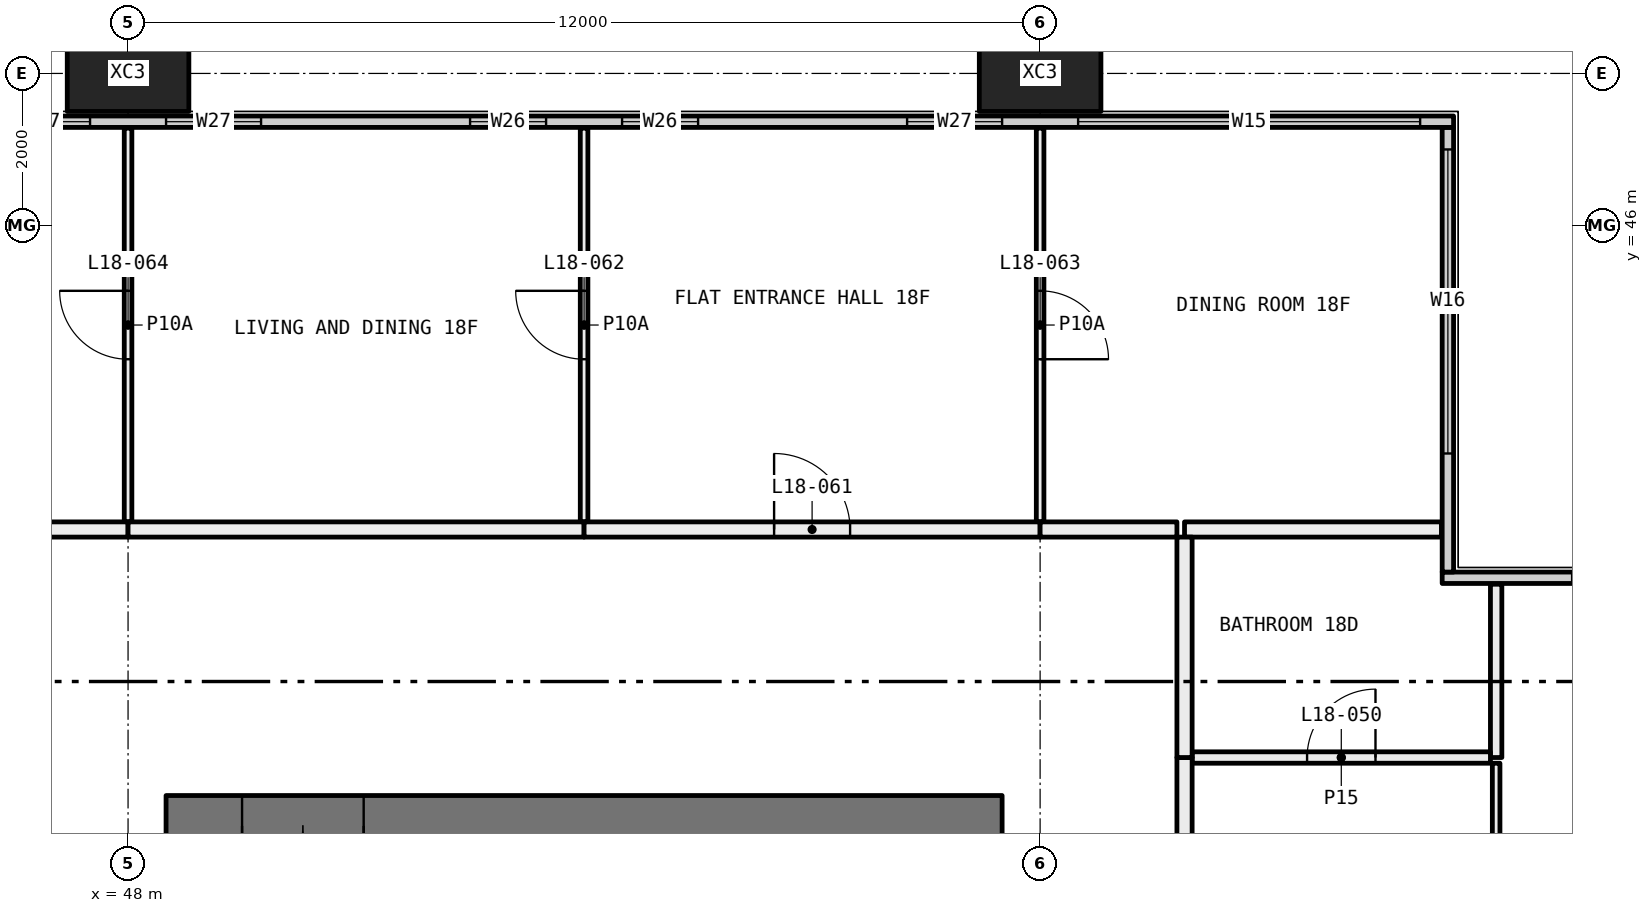
"""IFC4 building model, lengths in metres.
Left out: names, types, materials, properties, quantities, classifications, styles, units other than length and angle.
Written with IfcOpenShell. Run it as: python <this file> out.ifc"""

import sys

from ifc_helpers import new_model, si_unit, direction, frame, frame_2d, origin, origin_2d, place, context, subcontext, project, spatial, rectangle, hollow_rectangle, extrude, element, fill, save


model = new_model("IFC4")
c1 = context("Model", 3, precision=1e-05, world=origin(), true_north=direction((0.0, 1.0)))
c2 = subcontext(c1, "Body", "Model", "MODEL_VIEW")
j1 = project(units=[si_unit("LENGTHUNIT", "METRE"), si_unit("PLANEANGLEUNIT", "RADIAN")], contexts=[c1])
p1 = place(None, origin())
s1 = spatial("IfcSite", under=j1, at=p1, CompositionType="ELEMENT")
p2 = place(p1, origin())
s2 = spatial("IfcBuilding", under=s1, at=p2, CompositionType="ELEMENT")
p3 = place(p2, frame((0.0, 0.0, 74.85)))
s3 = spatial("IfcBuildingStorey", under=s2, at=p3, CompositionType="ELEMENT", Elevation=74.85)
for number, where, z_axis, x_axis in (
    (1, (48.0, 48.0, -0.4), (0.0, 0.0, 1.0), (1.0, 0.0, 0.0)),
    (2, (60.0, 48.0, -0.4), (0.0, 0.0, 1.0), (1.0, 0.0, 0.0)),
):
    element("IfcColumn", number, at=place(p3, frame(where, z_axis=z_axis, x_axis=x_axis)), inside=s3, PredefinedType="COLUMN", context=c2, shape_type="SweptSolid", body=[
        extrude(hollow_rectangle(XDim=1.6, YDim=1.0, WallThickness=0.065, at=origin_2d()), origin(), (0.0, 0.0, 1.0), 3.45),
    ])
p4 = place(p3, frame((65.29, 41.365, 0.0), z_axis=(0.0, 0.0, 1.0), x_axis=(1.0, 0.0, 0.0)))
e3 = element("IfcWall", 3, at=p4, inside=s3, PredefinedType="ELEMENTEDWALL", context=c2, shape_type="SweptSolid", body=[
    extrude(rectangle(XDim=6.15, YDim=0.15, at=frame_2d((3.075, 0.0))), origin(), (0.0, 0.0, 1.0), 3.05),
])
p5 = place(p4, frame((1.71, 0.0, 0.45)))
e4 = element("IfcOpeningElement", 4, at=p5, cuts=e3, PredefinedType="OPENING", context=c2, shape_type="SweptSolid", body=[
    extrude(rectangle(XDim=4.0, YDim=2.55, at=frame_2d((2.0, 1.275))), frame((0.0, 0.085, 0.0), z_axis=(0.0, -1.0, 0.0), x_axis=(1.0, 0.0, 0.0)), (0.0, 0.0, 1.0), 0.17),
])
p6 = place(p3, frame((65.365, 41.44, 0.0), z_axis=(0.0, 0.0, 1.0), x_axis=(0.0, 1.0, 0.0)))
e5 = element("IfcWall", 5, at=p6, inside=s3, PredefinedType="ELEMENTEDWALL", context=c2, shape_type="SweptSolid", body=[
    extrude(rectangle(XDim=5.85, YDim=0.15, at=frame_2d((2.925, 0.0))), origin(), (0.0, 0.0, 1.0), 3.05),
])
p7 = place(p6, frame((1.56, 0.0, 0.45)))
e6 = element("IfcOpeningElement", 6, at=p7, cuts=e5, PredefinedType="OPENING", context=c2, shape_type="SweptSolid", body=[
    extrude(rectangle(XDim=4.0, YDim=2.55, at=frame_2d((2.0, 1.275))), frame((0.0, 0.085, 0.0), z_axis=(0.0, -1.0, 0.0), x_axis=(1.0, 0.0, 0.0)), (0.0, 0.0, 1.0), 0.17),
])
p8 = place(p3, frame((6.56, 47.365, 0.0), z_axis=(0.0, 0.0, 1.0), x_axis=(1.0, 0.0, 0.0)))
e7 = element("IfcWall", 7, at=p8, inside=s3, PredefinedType="ELEMENTEDWALL", context=c2, shape_type="SweptSolid", body=[
    extrude(rectangle(XDim=58.88, YDim=0.15, at=frame_2d((29.44, 0.0))), origin(), (0.0, 0.0, 1.0), 3.05),
])
p9 = place(p8, frame((0.44, 0.0, 0.45)))
e8 = element("IfcOpeningElement", 8, at=p9, cuts=e7, PredefinedType="OPENING", context=c2, shape_type="SweptSolid", body=[
    extrude(rectangle(XDim=4.5, YDim=2.55, at=frame_2d((2.25, 1.275))), frame((0.0, 0.085, 0.0), z_axis=(0.0, -1.0, 0.0), x_axis=(1.0, 0.0, 0.0)), (0.0, 0.0, 1.0), 0.17),
])
p10 = place(p8, frame((5.94, 0.0, 0.45)))
e9 = element("IfcOpeningElement", 9, at=p10, cuts=e7, PredefinedType="OPENING", context=c2, shape_type="SweptSolid", body=[
    extrude(rectangle(XDim=1.25, YDim=2.55, at=frame_2d((0.625, 1.275))), frame((0.0, 0.085, 0.0), z_axis=(0.0, -1.0, 0.0), x_axis=(1.0, 0.0, 0.0)), (0.0, 0.0, 1.0), 0.17),
])
p11 = place(p8, frame((9.94, 0.0, 0.45)))
e10 = element("IfcOpeningElement", 10, at=p11, cuts=e7, PredefinedType="OPENING", context=c2, shape_type="SweptSolid", body=[
    extrude(rectangle(XDim=1.0, YDim=2.55, at=frame_2d((0.5, 1.275))), frame((0.0, 0.085, 0.0), z_axis=(0.0, -1.0, 0.0), x_axis=(1.0, 0.0, 0.0)), (0.0, 0.0, 1.0), 0.17),
])
p12 = place(p8, frame((11.94, 0.0, 0.45)))
e11 = element("IfcOpeningElement", 11, at=p12, cuts=e7, PredefinedType="OPENING", context=c2, shape_type="SweptSolid", body=[
    extrude(rectangle(XDim=1.0, YDim=2.55, at=frame_2d((0.5, 1.275))), frame((0.0, 0.085, 0.0), z_axis=(0.0, -1.0, 0.0), x_axis=(1.0, 0.0, 0.0)), (0.0, 0.0, 1.0), 0.17),
])
p13 = place(p8, frame((15.69, 0.0, 0.45)))
e12 = element("IfcOpeningElement", 12, at=p13, cuts=e7, PredefinedType="OPENING", context=c2, shape_type="SweptSolid", body=[
    extrude(rectangle(XDim=1.25, YDim=2.55, at=frame_2d((0.625, 1.275))), frame((0.0, 0.085, 0.0), z_axis=(0.0, -1.0, 0.0), x_axis=(1.0, 0.0, 0.0)), (0.0, 0.0, 1.0), 0.17),
])
p14 = place(p8, frame((17.94, 0.0, 0.45)))
e13 = element("IfcOpeningElement", 13, at=p14, cuts=e7, PredefinedType="OPENING", context=c2, shape_type="SweptSolid", body=[
    extrude(rectangle(XDim=1.25, YDim=2.55, at=frame_2d((0.625, 1.275))), frame((0.0, 0.085, 0.0), z_axis=(0.0, -1.0, 0.0), x_axis=(1.0, 0.0, 0.0)), (0.0, 0.0, 1.0), 0.17),
])
p15 = place(p8, frame((21.94, 0.0, 0.45)))
e14 = element("IfcOpeningElement", 14, at=p15, cuts=e7, PredefinedType="OPENING", context=c2, shape_type="SweptSolid", body=[
    extrude(rectangle(XDim=1.0, YDim=2.55, at=frame_2d((0.5, 1.275))), frame((0.0, 0.085, 0.0), z_axis=(0.0, -1.0, 0.0), x_axis=(1.0, 0.0, 0.0)), (0.0, 0.0, 1.0), 0.17),
])
p16 = place(p8, frame((23.94, 0.0, 0.45)))
e15 = element("IfcOpeningElement", 15, at=p16, cuts=e7, PredefinedType="OPENING", context=c2, shape_type="SweptSolid", body=[
    extrude(rectangle(XDim=1.0, YDim=2.55, at=frame_2d((0.5, 1.275))), frame((0.0, 0.085, 0.0), z_axis=(0.0, -1.0, 0.0), x_axis=(1.0, 0.0, 0.0)), (0.0, 0.0, 1.0), 0.17),
])
p17 = place(p8, frame((27.69, 0.0, 0.45)))
e16 = element("IfcOpeningElement", 16, at=p17, cuts=e7, PredefinedType="OPENING", context=c2, shape_type="SweptSolid", body=[
    extrude(rectangle(XDim=1.25, YDim=2.55, at=frame_2d((0.625, 1.275))), frame((0.0, 0.085, 0.0), z_axis=(0.0, -1.0, 0.0), x_axis=(1.0, 0.0, 0.0)), (0.0, 0.0, 1.0), 0.17),
])
p18 = place(p8, frame((29.94, 0.0, 0.45)))
e17 = element("IfcOpeningElement", 17, at=p18, cuts=e7, PredefinedType="OPENING", context=c2, shape_type="SweptSolid", body=[
    extrude(rectangle(XDim=1.25, YDim=2.55, at=frame_2d((0.625, 1.275))), frame((0.0, 0.085, 0.0), z_axis=(0.0, -1.0, 0.0), x_axis=(1.0, 0.0, 0.0)), (0.0, 0.0, 1.0), 0.17),
])
p19 = place(p8, frame((33.94, 0.0, 0.45)))
e18 = element("IfcOpeningElement", 18, at=p19, cuts=e7, PredefinedType="OPENING", context=c2, shape_type="SweptSolid", body=[
    extrude(rectangle(XDim=1.0, YDim=2.55, at=frame_2d((0.5, 1.275))), frame((0.0, 0.085, 0.0), z_axis=(0.0, -1.0, 0.0), x_axis=(1.0, 0.0, 0.0)), (0.0, 0.0, 1.0), 0.17),
])
p20 = place(p8, frame((35.94, 0.0, 0.45)))
e19 = element("IfcOpeningElement", 19, at=p20, cuts=e7, PredefinedType="OPENING", context=c2, shape_type="SweptSolid", body=[
    extrude(rectangle(XDim=1.0, YDim=2.55, at=frame_2d((0.5, 1.275))), frame((0.0, 0.085, 0.0), z_axis=(0.0, -1.0, 0.0), x_axis=(1.0, 0.0, 0.0)), (0.0, 0.0, 1.0), 0.17),
])
p21 = place(p8, frame((39.69, 0.0, 0.45)))
e20 = element("IfcOpeningElement", 20, at=p21, cuts=e7, PredefinedType="OPENING", context=c2, shape_type="SweptSolid", body=[
    extrude(rectangle(XDim=1.25, YDim=2.55, at=frame_2d((0.625, 1.275))), frame((0.0, 0.085, 0.0), z_axis=(0.0, -1.0, 0.0), x_axis=(1.0, 0.0, 0.0)), (0.0, 0.0, 1.0), 0.17),
])
p22 = place(p8, frame((41.94, 0.0, 0.45)))
e21 = element("IfcOpeningElement", 21, at=p22, cuts=e7, PredefinedType="OPENING", context=c2, shape_type="SweptSolid", body=[
    extrude(rectangle(XDim=1.25, YDim=2.55, at=frame_2d((0.625, 1.275))), frame((0.0, 0.085, 0.0), z_axis=(0.0, -1.0, 0.0), x_axis=(1.0, 0.0, 0.0)), (0.0, 0.0, 1.0), 0.17),
])
p23 = place(p8, frame((45.94, 0.0, 0.45)))
e22 = element("IfcOpeningElement", 22, at=p23, cuts=e7, PredefinedType="OPENING", context=c2, shape_type="SweptSolid", body=[
    extrude(rectangle(XDim=1.0, YDim=2.55, at=frame_2d((0.5, 1.275))), frame((0.0, 0.085, 0.0), z_axis=(0.0, -1.0, 0.0), x_axis=(1.0, 0.0, 0.0)), (0.0, 0.0, 1.0), 0.17),
])
p24 = place(p8, frame((47.94, 0.0, 0.45)))
e23 = element("IfcOpeningElement", 23, at=p24, cuts=e7, PredefinedType="OPENING", context=c2, shape_type="SweptSolid", body=[
    extrude(rectangle(XDim=1.0, YDim=2.55, at=frame_2d((0.5, 1.275))), frame((0.0, 0.085, 0.0), z_axis=(0.0, -1.0, 0.0), x_axis=(1.0, 0.0, 0.0)), (0.0, 0.0, 1.0), 0.17),
])
p25 = place(p8, frame((51.69, 0.0, 0.45)))
e24 = element("IfcOpeningElement", 24, at=p25, cuts=e7, PredefinedType="OPENING", context=c2, shape_type="SweptSolid", body=[
    extrude(rectangle(XDim=1.25, YDim=2.55, at=frame_2d((0.625, 1.275))), frame((0.0, 0.085, 0.0), z_axis=(0.0, -1.0, 0.0), x_axis=(1.0, 0.0, 0.0)), (0.0, 0.0, 1.0), 0.17),
])
p26 = place(p8, frame((53.94, 0.0, 0.45)))
e25 = element("IfcOpeningElement", 25, at=p26, cuts=e7, PredefinedType="OPENING", context=c2, shape_type="SweptSolid", body=[
    extrude(rectangle(XDim=4.5, YDim=2.55, at=frame_2d((2.25, 1.275))), frame((0.0, 0.085, 0.0), z_axis=(0.0, -1.0, 0.0), x_axis=(1.0, 0.0, 0.0)), (0.0, 0.0, 1.0), 0.17),
])
p27 = place(p3, frame((66.0, 38.925, 0.0), z_axis=(0.0, 0.0, 1.0), x_axis=(0.0, -1.0, 0.0)))
e26 = element("IfcWall", 26, at=p27, inside=s3, PredefinedType="PARTITIONING", context=c2, shape_type="SweptSolid", body=[
    extrude(rectangle(XDim=2.875, YDim=0.1, at=frame_2d((1.438, 0.0))), origin(), (0.0, 0.0, 1.0), 2.45),
])
p28 = place(p3, frame((66.0, 41.28, 0.0), z_axis=(0.0, 0.0, 1.0), x_axis=(0.0, -1.0, 0.0)))
e27 = element("IfcWall", 27, at=p28, inside=s3, PredefinedType="PARTITIONING", context=c2, shape_type="SweptSolid", body=[
    extrude(rectangle(XDim=2.28, YDim=0.15, at=frame_2d((1.14, 0.0))), origin(), (0.0, 0.0, 1.0), 3.05),
])
p29 = place(p3, frame((65.925, 39.0, 0.0), z_axis=(0.0, 0.0, 1.0), x_axis=(-1.0, 0.0, 0.0)))
e28 = element("IfcWall", 28, at=p29, inside=s3, PredefinedType="PARTITIONING", context=c2, shape_type="SweptSolid", body=[
    extrude(rectangle(XDim=3.925, YDim=0.15, at=frame_2d((1.962, 0.0))), origin(), (0.0, 0.0, 1.0), 3.05),
])
p30 = place(p29, frame((1.512, 0.0, 0.0)))
e29 = element("IfcOpeningElement", 29, at=p30, cuts=e28, PredefinedType="OPENING", context=c2, shape_type="SweptSolid", body=[
    extrude(rectangle(XDim=0.9, YDim=2.1, at=frame_2d((0.45, 1.05))), frame((0.0, 0.085, 0.0), z_axis=(0.0, -1.0, 0.0), x_axis=(1.0, 0.0, 0.0)), (0.0, 0.0, 1.0), 0.17),
])
p31 = place(p3, frame((61.9, 39.0, 0.0), z_axis=(0.0, 0.0, 1.0), x_axis=(0.0, -1.0, 0.0)))
e30 = element("IfcWall", 30, at=p31, inside=s3, PredefinedType="PARTITIONING", context=c2, shape_type="SweptSolid", body=[
    extrude(rectangle(XDim=3.1, YDim=0.2, at=frame_2d((1.55, 0.0))), origin(), (0.0, 0.0, 1.0), 2.45),
])
p32 = place(p3, frame((65.28, 42.0, 0.0), z_axis=(0.0, 0.0, 1.0), x_axis=(-1.0, 0.0, 0.0)))
e31 = element("IfcWall", 31, at=p32, inside=s3, PredefinedType="PARTITIONING", context=c2, shape_type="SweptSolid", body=[
    extrude(rectangle(XDim=3.38, YDim=0.2, at=frame_2d((1.69, 0.0))), origin(), (0.0, 0.0, 1.0), 3.05),
])
p33 = place(p3, frame((61.9, 41.9, 0.0), z_axis=(0.0, 0.0, 1.0), x_axis=(0.0, -1.0, 0.0)))
e32 = element("IfcWall", 32, at=p33, inside=s3, PredefinedType="PARTITIONING", context=c2, shape_type="SweptSolid", body=[
    extrude(rectangle(XDim=2.9, YDim=0.2, at=frame_2d((1.45, 0.0))), origin(), (0.0, 0.0, 1.0), 3.05),
])
p34 = place(p3, frame((48.0, 42.1, 0.0), z_axis=(0.0, 0.0, 1.0), x_axis=(0.0, 1.0, 0.0)))
e33 = element("IfcWall", 33, at=p34, inside=s3, PredefinedType="PARTITIONING", context=c2, shape_type="SweptSolid", body=[
    extrude(rectangle(XDim=5.18, YDim=0.1, at=frame_2d((2.59, 0.0))), origin(), (0.0, 0.0, 1.0), 3.05),
])
p35 = place(p34, frame((2.14, 0.0, 0.0)))
e34 = element("IfcOpeningElement", 34, at=p35, cuts=e33, PredefinedType="OPENING", context=c2, shape_type="SweptSolid", body=[
    extrude(rectangle(XDim=0.9, YDim=2.1, at=frame_2d((0.45, 1.05))), frame((0.0, 0.06, 0.0), z_axis=(0.0, -1.0, 0.0), x_axis=(1.0, 0.0, 0.0)), (0.0, 0.0, 1.0), 0.12),
])
p36 = place(p3, frame((46.1, 42.0, 0.0), z_axis=(0.0, 0.0, 1.0), x_axis=(1.0, 0.0, 0.0)))
e35 = element("IfcWall", 35, at=p36, inside=s3, PredefinedType="PARTITIONING", context=c2, shape_type="SweptSolid", body=[
    extrude(rectangle(XDim=1.9, YDim=0.2, at=frame_2d((0.95, 0.0))), origin(), (0.0, 0.0, 1.0), 3.05),
])
p37 = place(p3, frame((54.0, 42.1, 0.0), z_axis=(0.0, 0.0, 1.0), x_axis=(0.0, 1.0, 0.0)))
e36 = element("IfcWall", 36, at=p37, inside=s3, PredefinedType="PARTITIONING", context=c2, shape_type="SweptSolid", body=[
    extrude(rectangle(XDim=5.18, YDim=0.1, at=frame_2d((2.59, 0.0))), origin(), (0.0, 0.0, 1.0), 3.05),
])
p38 = place(p37, frame((2.14, 0.0, 0.0)))
e37 = element("IfcOpeningElement", 37, at=p38, cuts=e36, PredefinedType="OPENING", context=c2, shape_type="SweptSolid", body=[
    extrude(rectangle(XDim=0.9, YDim=2.1, at=frame_2d((0.45, 1.05))), frame((0.0, 0.06, 0.0), z_axis=(0.0, -1.0, 0.0), x_axis=(1.0, 0.0, 0.0)), (0.0, 0.0, 1.0), 0.12),
])
p39 = place(p3, frame((48.0, 42.0, 0.0), z_axis=(0.0, 0.0, 1.0), x_axis=(1.0, 0.0, 0.0)))
e38 = element("IfcWall", 38, at=p39, inside=s3, PredefinedType="PARTITIONING", context=c2, shape_type="SweptSolid", body=[
    extrude(rectangle(XDim=6.0, YDim=0.2, at=frame_2d((3.0, 0.0))), origin(), (0.0, 0.0, 1.0), 3.05),
])
p40 = place(p3, frame((60.0, 42.1, 0.0), z_axis=(0.0, 0.0, 1.0), x_axis=(0.0, 1.0, 0.0)))
e39 = element("IfcWall", 39, at=p40, inside=s3, PredefinedType="PARTITIONING", context=c2, shape_type="SweptSolid", body=[
    extrude(rectangle(XDim=5.18, YDim=0.1, at=frame_2d((2.59, 0.0))), origin(), (0.0, 0.0, 1.0), 3.05),
])
p41 = place(p40, frame((2.14, 0.0, 0.0)))
e40 = element("IfcOpeningElement", 40, at=p41, cuts=e39, PredefinedType="OPENING", context=c2, shape_type="SweptSolid", body=[
    extrude(rectangle(XDim=0.9, YDim=2.1, at=frame_2d((0.45, 1.05))), frame((0.0, 0.06, 0.0), z_axis=(0.0, -1.0, 0.0), x_axis=(1.0, 0.0, 0.0)), (0.0, 0.0, 1.0), 0.12),
])
p42 = place(p3, frame((54.0, 42.0, 0.0), z_axis=(0.0, 0.0, 1.0), x_axis=(1.0, 0.0, 0.0)))
e41 = element("IfcWall", 41, at=p42, inside=s3, PredefinedType="PARTITIONING", context=c2, shape_type="SweptSolid", body=[
    extrude(rectangle(XDim=6.0, YDim=0.2, at=frame_2d((3.0, 0.0))), origin(), (0.0, 0.0, 1.0), 3.05),
])
p43 = place(p42, frame((2.5, 0.0, 0.0)))
e42 = element("IfcOpeningElement", 42, at=p43, cuts=e41, PredefinedType="OPENING", context=c2, shape_type="SweptSolid", body=[
    extrude(rectangle(XDim=1.0, YDim=2.1, at=frame_2d((0.5, 1.05))), frame((0.0, 0.11, 0.0), z_axis=(0.0, -1.0, 0.0), x_axis=(1.0, 0.0, 0.0)), (0.0, 0.0, 1.0), 0.22),
])
p44 = place(p3, frame((60.0, 42.0, 0.0), z_axis=(0.0, 0.0, 1.0), x_axis=(1.0, 0.0, 0.0)))
e43 = element("IfcWall", 43, at=p44, inside=s3, PredefinedType="PARTITIONING", context=c2, shape_type="SweptSolid", body=[
    extrude(rectangle(XDim=1.8, YDim=0.2, at=frame_2d((0.9, 0.0))), origin(), (0.0, 0.0, 1.0), 3.05),
])
p45 = place(p3, frame((59.5, 38.1, 0.0), z_axis=(0.0, 0.0, 1.0), x_axis=(-1.0, 0.0, 0.0)))
e44 = element("IfcWall", 44, at=p45, inside=s3, PredefinedType="SHEAR", context=c2, shape_type="SweptSolid", body=[
    extrude(rectangle(XDim=11.0, YDim=0.8, at=frame_2d((5.5, 0.0))), origin(), (0.0, 0.0, 1.0), 3.05),
])
p46 = place(p45, frame((8.4, 0.0, 0.0)))
e45 = element("IfcOpeningElement", 45, at=p46, cuts=e44, PredefinedType="OPENING", context=c2, shape_type="SweptSolid", body=[
    extrude(rectangle(XDim=1.6, YDim=2.1, at=frame_2d((0.8, 1.05))), frame((0.0, 0.41, 0.0), z_axis=(0.0, -1.0, 0.0), x_axis=(1.0, 0.0, 0.0)), (0.0, 0.0, 1.0), 0.82),
])
p47 = place(p7, origin())
e46 = element("IfcWindow", 46, at=p47, inside=s3, PartitioningType="SINGLE_PANEL", PredefinedType="WINDOW", context=c2, shape_type="SweptSolid", body=[
    extrude(rectangle(XDim=4.0, YDim=2.55, at=frame_2d((2.0, 1.275))), frame((0.0, 0.03, 0.0), z_axis=(0.0, -1.0, 0.0), x_axis=(1.0, 0.0, 0.0)), (0.0, 0.0, 1.0), 0.06),
])
fill(e6, e46)
p48 = place(p21, origin())
e47 = element("IfcWindow", 47, at=p48, inside=s3, PartitioningType="SINGLE_PANEL", PredefinedType="WINDOW", context=c2, shape_type="SweptSolid", body=[
    extrude(rectangle(XDim=1.25, YDim=2.55, at=frame_2d((0.625, 1.275))), frame((0.0, 0.03, 0.0), z_axis=(0.0, -1.0, 0.0), x_axis=(1.0, 0.0, 0.0)), (0.0, 0.0, 1.0), 0.06),
])
fill(e20, e47)
p49 = place(p22, origin())
e48 = element("IfcWindow", 48, at=p49, inside=s3, PartitioningType="SINGLE_PANEL", PredefinedType="WINDOW", context=c2, shape_type="SweptSolid", body=[
    extrude(rectangle(XDim=1.25, YDim=2.55, at=frame_2d((0.625, 1.275))), frame((0.0, 0.03, 0.0), z_axis=(0.0, -1.0, 0.0), x_axis=(1.0, 0.0, 0.0)), (0.0, 0.0, 1.0), 0.06),
])
fill(e21, e48)
p50 = place(p23, origin())
e49 = element("IfcWindow", 49, at=p50, inside=s3, PartitioningType="SINGLE_PANEL", PredefinedType="WINDOW", context=c2, shape_type="SweptSolid", body=[
    extrude(rectangle(XDim=1.0, YDim=2.55, at=frame_2d((0.5, 1.275))), frame((0.0, 0.03, 0.0), z_axis=(0.0, -1.0, 0.0), x_axis=(1.0, 0.0, 0.0)), (0.0, 0.0, 1.0), 0.06),
])
fill(e22, e49)
p51 = place(p24, origin())
e50 = element("IfcWindow", 50, at=p51, inside=s3, PartitioningType="SINGLE_PANEL", PredefinedType="WINDOW", context=c2, shape_type="SweptSolid", body=[
    extrude(rectangle(XDim=1.0, YDim=2.55, at=frame_2d((0.5, 1.275))), frame((0.0, 0.03, 0.0), z_axis=(0.0, -1.0, 0.0), x_axis=(1.0, 0.0, 0.0)), (0.0, 0.0, 1.0), 0.06),
])
fill(e23, e50)
p52 = place(p25, origin())
e51 = element("IfcWindow", 51, at=p52, inside=s3, PartitioningType="SINGLE_PANEL", PredefinedType="WINDOW", context=c2, shape_type="SweptSolid", body=[
    extrude(rectangle(XDim=1.25, YDim=2.55, at=frame_2d((0.625, 1.275))), frame((0.0, 0.03, 0.0), z_axis=(0.0, -1.0, 0.0), x_axis=(1.0, 0.0, 0.0)), (0.0, 0.0, 1.0), 0.06),
])
fill(e24, e51)
p53 = place(p26, origin())
e52 = element("IfcWindow", 52, at=p53, inside=s3, PartitioningType="SINGLE_PANEL", PredefinedType="WINDOW", context=c2, shape_type="SweptSolid", body=[
    extrude(rectangle(XDim=4.5, YDim=2.55, at=frame_2d((2.25, 1.275))), frame((0.0, 0.03, 0.0), z_axis=(0.0, -1.0, 0.0), x_axis=(1.0, 0.0, 0.0)), (0.0, 0.0, 1.0), 0.06),
])
fill(e25, e52)
p54 = place(p30, frame((0.9, 0.0, 0.0), x_axis=(-1.0, 0.0, 0.0)))
e53 = element("IfcDoor", 53, at=p54, inside=s3, OperationType="SINGLE_SWING_LEFT", PredefinedType="DOOR", context=c2, shape_type="SweptSolid", body=[
    extrude(rectangle(XDim=0.9, YDim=2.1, at=frame_2d((0.45, 1.05))), frame((0.0, 0.025, 0.0), z_axis=(0.0, -1.0, 0.0), x_axis=(1.0, 0.0, 0.0)), (0.0, 0.0, 1.0), 0.05),
])
fill(e29, e53)
p55 = place(p43, origin())
e54 = element("IfcDoor", 54, at=p55, inside=s3, OperationType="SINGLE_SWING_RIGHT", PredefinedType="DOOR", context=c2, shape_type="SweptSolid", body=[
    extrude(rectangle(XDim=1.0, YDim=2.1, at=frame_2d((0.5, 1.05))), frame((0.0, 0.025, 0.0), z_axis=(0.0, -1.0, 0.0), x_axis=(1.0, 0.0, 0.0)), (0.0, 0.0, 1.0), 0.05),
])
fill(e42, e54)
p56 = place(p38, origin())
e55 = element("IfcDoor", 55, at=p56, inside=s3, OperationType="SINGLE_SWING_LEFT", PredefinedType="DOOR", context=c2, shape_type="SweptSolid", body=[
    extrude(rectangle(XDim=0.9, YDim=2.1, at=frame_2d((0.45, 1.05))), frame((0.0, 0.025, 0.0), z_axis=(0.0, -1.0, 0.0), x_axis=(1.0, 0.0, 0.0)), (0.0, 0.0, 1.0), 0.05),
])
fill(e37, e55)
p57 = place(p41, frame((0.9, 0.0, 0.0), x_axis=(-1.0, 0.0, 0.0)))
e56 = element("IfcDoor", 56, at=p57, inside=s3, OperationType="SINGLE_SWING_LEFT", PredefinedType="DOOR", context=c2, shape_type="SweptSolid", body=[
    extrude(rectangle(XDim=0.9, YDim=2.1, at=frame_2d((0.45, 1.05))), frame((0.0, 0.025, 0.0), z_axis=(0.0, -1.0, 0.0), x_axis=(1.0, 0.0, 0.0)), (0.0, 0.0, 1.0), 0.05),
])
fill(e40, e56)
p58 = place(p35, origin())
e57 = element("IfcDoor", 57, at=p58, inside=s3, OperationType="SINGLE_SWING_LEFT", PredefinedType="DOOR", context=c2, shape_type="SweptSolid", body=[
    extrude(rectangle(XDim=0.9, YDim=2.1, at=frame_2d((0.45, 1.05))), frame((0.0, 0.025, 0.0), z_axis=(0.0, -1.0, 0.0), x_axis=(1.0, 0.0, 0.0)), (0.0, 0.0, 1.0), 0.05),
])
fill(e34, e57)
p59 = place(p46, origin())
e58 = element("IfcDoor", 58, at=p59, inside=s3, OperationType="DOUBLE_DOOR_SINGLE_SWING", PredefinedType="DOOR", context=c2, shape_type="SweptSolid", body=[
    extrude(rectangle(XDim=1.6, YDim=2.1, at=frame_2d((0.8, 1.05))), frame((0.0, 0.025, 0.0), z_axis=(0.0, -1.0, 0.0), x_axis=(1.0, 0.0, 0.0)), (0.0, 0.0, 1.0), 0.05),
])
fill(e45, e58)
save(model, sys.argv[1])
